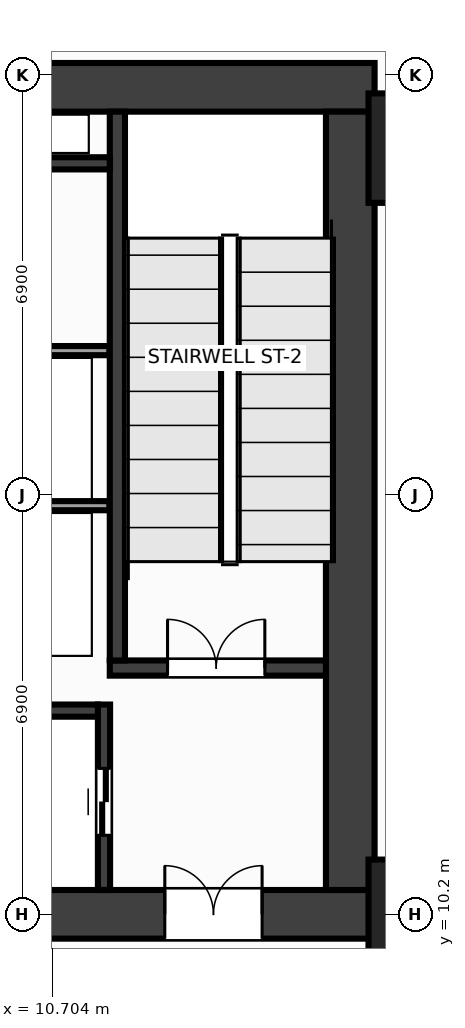
"""IFC4 building model, lengths in metres.
Left out: names, types, materials, properties, quantities, classifications, styles, units other than length and angle.
Written with IfcOpenShell. Run it as: python <this file> out.ifc"""

import sys

from ifc_helpers import new_model, si_unit, direction, frame, frame_2d, origin, origin_2d, place, context, subcontext, project, spatial, rectangle, extrude, source, transform, mapped, element, fill, save


model = new_model("IFC4")
c1 = context("Model", 3, precision=1e-05, world=origin(), true_north=direction((0.0, 1.0)))
c2 = subcontext(c1, "Body", "Model", "MODEL_VIEW")
j1 = project(units=[si_unit("LENGTHUNIT", "METRE"), si_unit("PLANEANGLEUNIT", "RADIAN")], contexts=[c1])
p1 = place(None, origin())
s1 = spatial("IfcSite", under=j1, at=p1, CompositionType="ELEMENT")
p2 = place(p1, origin())
s2 = spatial("IfcBuilding", under=s1, at=p2, CompositionType="ELEMENT")
p3 = place(p2, frame((0.0, 0.0, 70.4)))
s3 = spatial("IfcBuildingStorey", under=s2, at=p3, CompositionType="ELEMENT", Elevation=70.4)
m1 = source(origin(), c2, "Body", "SweptSolid", [
    extrude(rectangle(XDim=32.0, YDim=0.8, at=frame_2d((16.0, 0.0))), origin(), (0.0, 0.0, 1.0), 7.2),
])
p4 = place(p3, frame((-16.0, 23.8, 0.0), z_axis=(0.0, 0.0, 1.0), x_axis=(1.0, 0.0, 0.0)))
e1 = element("IfcWall", 1, at=p4, inside=s3, PredefinedType="SHEAR", context=c2, shape_type="MappedRepresentation", body=[
    mapped(m1, transform((0.0, 0.0, 0.0), x_axis=(1.0, 0.0, 0.0), y_axis=(0.0, 1.0, 0.0), z_axis=(0.0, 0.0, 1.0), scale=1.0)),
])
p5 = place(p3, frame((-16.0, 10.2, 0.0), z_axis=(0.0, 0.0, 1.0), x_axis=(1.0, 0.0, 0.0)))
e2 = element("IfcWall", 2, at=p5, inside=s3, PredefinedType="SHEAR", context=c2, shape_type="MappedRepresentation", body=[
    mapped(m1, transform((0.0, 0.0, 0.0), x_axis=(1.0, 0.0, 0.0), y_axis=(0.0, 1.0, 0.0), z_axis=(0.0, 0.0, 1.0), scale=1.0)),
])
p6 = place(p5, frame((1.85, 0.0, 0.0)))
e3 = element("IfcOpeningElement", 3, at=p6, cuts=e2, PredefinedType="OPENING", context=c2, shape_type="SweptSolid", body=[
    extrude(rectangle(XDim=1.6, YDim=2.15, at=frame_2d((0.8, 1.075))), frame((0.0, 0.412, 0.0), z_axis=(0.0, -1.0, 0.0), x_axis=(1.0, 0.0, 0.0)), (0.0, 0.0, 1.0), 0.824),
])
p7 = place(p5, frame((28.55, 0.0, 0.0)))
e4 = element("IfcOpeningElement", 4, at=p7, cuts=e2, PredefinedType="OPENING", context=c2, shape_type="SweptSolid", body=[
    extrude(rectangle(XDim=1.6, YDim=2.15, at=frame_2d((0.8, 1.075))), frame((0.0, 0.412, 0.0), z_axis=(0.0, -1.0, 0.0), x_axis=(1.0, 0.0, 0.0)), (0.0, 0.0, 1.0), 0.824),
])
p8 = place(p5, frame((15.25, 0.0, 0.0)))
e5 = element("IfcOpeningElement", 5, at=p8, cuts=e2, PredefinedType="OPENING", context=c2, shape_type="SweptSolid", body=[
    extrude(rectangle(XDim=1.5, YDim=2.2, at=frame_2d((0.75, 1.1))), frame((0.0, 0.412, 0.0), z_axis=(0.0, -1.0, 0.0), x_axis=(1.0, 0.0, 0.0)), (0.0, 0.0, 1.0), 0.824),
])
m2 = source(origin(), c2, "Body", "SweptSolid", [
    extrude(rectangle(XDim=12.8, YDim=0.8, at=frame_2d((6.4, 0.0))), origin(), (0.0, 0.0, 1.0), 7.2),
])
p9 = place(p3, frame((15.6, 10.6, 0.0), z_axis=(0.0, 0.0, 1.0), x_axis=(0.0, 1.0, 0.0)))
e6 = element("IfcWall", 6, at=p9, inside=s3, PredefinedType="SHEAR", context=c2, shape_type="MappedRepresentation", body=[
    mapped(m2, transform((0.0, 0.0, 0.0), x_axis=(1.0, 0.0, 0.0), y_axis=(0.0, 1.0, 0.0), z_axis=(0.0, 0.0, 1.0), scale=1.0)),
])
m3 = source(origin(), c2, "Body", "SweptSolid", [
    extrude(rectangle(XDim=3.555, YDim=0.25, at=frame_2d((1.777, 0.0))), origin(), (0.0, 0.0, 1.0), 7.2),
])
p10 = place(p3, frame((11.645, 14.25, 0.0), z_axis=(0.0, 0.0, 1.0), x_axis=(1.0, 0.0, 0.0)))
e7 = element("IfcWall", 7, at=p10, inside=s3, PredefinedType="SHEAR", context=c2, shape_type="MappedRepresentation", body=[
    mapped(m3, transform((0.0, 0.0, 0.0), x_axis=(1.0, 0.0, 0.0), y_axis=(0.0, 1.0, 0.0), z_axis=(0.0, 0.0, 1.0), scale=1.0)),
])
p11 = place(p10, frame((0.95, 0.0, 0.0)))
e8 = element("IfcOpeningElement", 8, at=p11, cuts=e7, PredefinedType="OPENING", context=c2, shape_type="SweptSolid", body=[
    extrude(rectangle(XDim=1.6, YDim=2.15, at=frame_2d((0.8, 1.075))), frame((0.0, 0.137, 0.0), z_axis=(0.0, -1.0, 0.0), x_axis=(1.0, 0.0, 0.0)), (0.0, 0.0, 1.0), 0.274),
])
m4 = source(origin(), c2, "Body", "SweptSolid", [
    extrude(rectangle(XDim=9.025, YDim=0.25, at=frame_2d((4.512, 0.0))), origin(), (0.0, 0.0, 1.0), 7.2),
])
p12 = place(p3, frame((11.77, 14.375, 0.0), z_axis=(0.0, 0.0, 1.0), x_axis=(0.0, 1.0, 0.0)))
e9 = element("IfcWall", 9, at=p12, inside=s3, PredefinedType="SHEAR", context=c2, shape_type="MappedRepresentation", body=[
    mapped(m4, transform((0.0, 0.0, 0.0), x_axis=(1.0, 0.0, 0.0), y_axis=(0.0, 1.0, 0.0), z_axis=(0.0, 0.0, 1.0), scale=1.0)),
])
m5 = source(origin(), c2, "Body", "SweptSolid", [
    extrude(rectangle(XDim=3.05, YDim=0.2, at=frame_2d((1.525, 0.0))), origin(), (0.0, 0.0, 1.0), 7.2),
])
p13 = place(p3, frame((11.55, 10.6, 0.0), z_axis=(0.0, 0.0, 1.0), x_axis=(0.0, 1.0, 0.0)))
e10 = element("IfcWall", 10, at=p13, inside=s3, PredefinedType="SHEAR", context=c2, shape_type="MappedRepresentation", body=[
    mapped(m5, transform((0.0, 0.0, 0.0), x_axis=(1.0, 0.0, 0.0), y_axis=(0.0, 1.0, 0.0), z_axis=(0.0, 0.0, 1.0), scale=1.0)),
])
p14 = place(p13, frame((0.9, 0.0, 0.0)))
e11 = element("IfcOpeningElement", 11, at=p14, cuts=e10, PredefinedType="OPENING", context=c2, shape_type="SweptSolid", body=[
    extrude(rectangle(XDim=1.1, YDim=2.15, at=frame_2d((0.55, 1.075))), frame((0.0, 0.112, 0.0), z_axis=(0.0, -1.0, 0.0), x_axis=(1.0, 0.0, 0.0)), (0.0, 0.0, 1.0), 0.224),
])
m6 = source(origin(), c2, "Body", "SweptSolid", [
    extrude(rectangle(XDim=2.825, YDim=0.2, at=frame_2d((1.413, 0.0))), origin(), (0.0, 0.0, 1.0), 7.2),
])
p15 = place(p3, frame((8.625, 13.55, 0.0), z_axis=(0.0, 0.0, 1.0), x_axis=(1.0, 0.0, 0.0)))
e12 = element("IfcWall", 12, at=p15, inside=s3, PredefinedType="SHEAR", context=c2, shape_type="MappedRepresentation", body=[
    mapped(m6, transform((0.0, 0.0, 0.0), x_axis=(1.0, 0.0, 0.0), y_axis=(0.0, 1.0, 0.0), z_axis=(0.0, 0.0, 1.0), scale=1.0)),
])
m7 = source(origin(), c2, "Body", "SweptSolid", [
    extrude(rectangle(XDim=3.02, YDim=0.2, at=frame_2d((1.51, 0.0))), origin(), (0.0, 0.0, 1.0), 7.2),
])
p16 = place(p3, frame((8.625, 22.55, 0.0), z_axis=(0.0, 0.0, 1.0), x_axis=(1.0, 0.0, 0.0)))
e13 = element("IfcWall", 13, at=p16, inside=s3, PredefinedType="SHEAR", context=c2, shape_type="MappedRepresentation", body=[
    mapped(m7, transform((0.0, 0.0, 0.0), x_axis=(1.0, 0.0, 0.0), y_axis=(0.0, 1.0, 0.0), z_axis=(0.0, 0.0, 1.0), scale=1.0)),
])
m8 = source(origin(), c2, "Body", "SweptSolid", [
    extrude(rectangle(XDim=1.8, YDim=1.8, at=origin_2d()), origin(), (0.0, 0.0, 1.0), 7.2),
])
for number, where, z_axis, x_axis in (
    (14, (16.8, 10.2, 0.0), (0.0, 0.0, 1.0), (1.0, 0.0, 0.0)),
    (15, (16.8, 22.8, 0.0), (0.0, 0.0, 1.0), (1.0, 0.0, 0.0)),
):
    element("IfcColumn", number, at=place(p3, frame(where, z_axis=z_axis, x_axis=x_axis)), inside=s3, PredefinedType="COLUMN", context=c2, shape_type="MappedRepresentation", body=[
        mapped(m8, transform((0.0, 0.0, 0.0), x_axis=(1.0, 0.0, 0.0), y_axis=(0.0, 1.0, 0.0), z_axis=(0.0, 0.0, 1.0), scale=1.0)),
    ])
m9 = source(origin(), c2, "Body", "SweptSolid", [
    extrude(rectangle(XDim=3.01, YDim=0.15, at=frame_2d((1.505, 0.0))), origin(), (0.0, 0.0, 1.0), 6.9),
])
for number, where, z_axis, x_axis in (
    (16, (8.63, 16.92, 0.0), (0.0, 0.0, 1.0), (1.0, 0.0, 0.0)),
    (17, (8.63, 19.47, 0.0), (0.0, 0.0, 1.0), (1.0, 0.0, 0.0)),
):
    element("IfcWall", number, at=place(p3, frame(where, z_axis=z_axis, x_axis=x_axis)), inside=s3, PredefinedType="PARTITIONING", context=c2, shape_type="MappedRepresentation", body=[
        mapped(m9, transform((0.0, 0.0, 0.0), x_axis=(1.0, 0.0, 0.0), y_axis=(0.0, 1.0, 0.0), z_axis=(0.0, 0.0, 1.0), scale=1.0)),
    ])
m10 = source(origin(), c2, "Body", "SweptSolid", [
    extrude(rectangle(XDim=1.6, YDim=2.15, at=frame_2d((0.8, 1.075))), frame((0.0, 0.025, 0.0), z_axis=(0.0, -1.0, 0.0), x_axis=(1.0, 0.0, 0.0)), (0.0, 0.0, 1.0), 0.05),
])
p17 = place(p11, origin())
e18 = element("IfcDoor", 18, at=p17, inside=s3, OperationType="DOUBLE_DOOR_SINGLE_SWING", PredefinedType="DOOR", context=c2, shape_type="MappedRepresentation", body=[
    mapped(m10, transform((0.0, 0.0, 0.0), x_axis=(1.0, 0.0, 0.0), y_axis=(0.0, 1.0, 0.0), z_axis=(0.0, 0.0, 1.0), scale=1.0)),
])
fill(e8, e18)
p18 = place(p7, origin())
e19 = element("IfcDoor", 19, at=p18, inside=s3, OperationType="DOUBLE_DOOR_SINGLE_SWING", PredefinedType="DOOR", context=c2, shape_type="MappedRepresentation", body=[
    mapped(m10, transform((0.0, 0.0, 0.0), x_axis=(1.0, 0.0, 0.0), y_axis=(0.0, 1.0, 0.0), z_axis=(0.0, 0.0, 1.0), scale=1.0)),
])
fill(e4, e19)
m11 = source(origin(), c2, "Body", "SweptSolid", [
    extrude(rectangle(XDim=1.1, YDim=2.15, at=frame_2d((0.55, 1.075))), frame((0.0, 0.025, 0.0), z_axis=(0.0, -1.0, 0.0), x_axis=(1.0, 0.0, 0.0)), (0.0, 0.0, 1.0), 0.05),
])
p19 = place(p14, origin())
e20 = element("IfcDoor", 20, at=p19, inside=s3, OperationType="DOUBLE_DOOR_SLIDING", PredefinedType="DOOR", context=c2, shape_type="MappedRepresentation", body=[
    mapped(m11, transform((0.0, 0.0, 0.0), x_axis=(1.0, 0.0, 0.0), y_axis=(0.0, 1.0, 0.0), z_axis=(0.0, 0.0, 1.0), scale=1.0)),
])
fill(e11, e20)
save(model, sys.argv[1])
